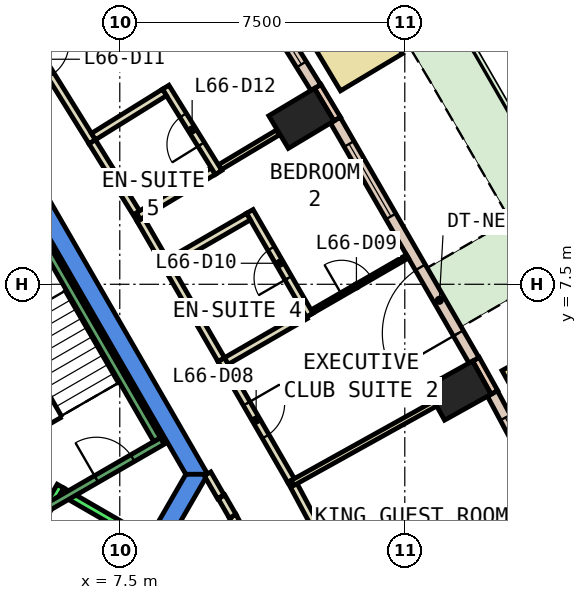
"""IFC4 building model, lengths in metres.
Left out: names, types, materials, properties, quantities, classifications, styles, units other than length and angle.
Written with IfcOpenShell. Run it as: python <this file> out.ifc"""

import sys

from ifc_helpers import new_model, si_unit, direction, frame, frame_2d, origin, origin_2d, place, context, subcontext, project, spatial, polyline, rectangle, outline, extrude, element, fill, save


model = new_model("IFC4")
c1 = context("Model", 3, precision=1e-05, world=origin(), true_north=direction((0.0, 1.0)))
c2 = subcontext(c1, "Body", "Model", "MODEL_VIEW")
j1 = project(units=[si_unit("LENGTHUNIT", "METRE"), si_unit("PLANEANGLEUNIT", "RADIAN")], contexts=[c1])
p1 = place(None, origin())
s1 = spatial("IfcSite", under=j1, at=p1, CompositionType="ELEMENT")
p2 = place(p1, origin())
s2 = spatial("IfcBuilding", under=s1, at=p2, CompositionType="ELEMENT")
p3 = place(p2, frame((0.0, 0.0, 286.4)))
s3 = spatial("IfcBuildingStorey", under=s2, at=p3, CompositionType="ELEMENT", Elevation=286.4)
for number, where, z_axis, x_axis in (
    (1, (16.415, 4.702, 0.0), (0.0, 0.0, 1.0), (-0.486, 0.874, 0.0)),
    (2, (12.279, 11.865, 0.0), (0.0, 0.0, 1.0), (-0.514, 0.858, 0.0)),
):
    element("IfcColumn", number, at=place(p3, frame(where, z_axis=z_axis, x_axis=x_axis)), inside=s3, PredefinedType="COLUMN", context=c2, shape_type="SweptSolid", body=[
        extrude(rectangle(XDim=1.0, YDim=1.4, at=origin_2d()), origin(), (0.0, 0.0, 1.0), 3.26),
    ])
p4 = place(p3, frame((0.0, 0.0, -0.6)))
e3 = element("IfcWall", 3, at=p4, inside=s3, PredefinedType="SHEAR", context=c2, shape_type="SweptSolid", body=[
    extrude(outline(polyline([(5.486, 9.998), (5.053, 9.748), (9.238, 2.5), (9.815, 2.5), (5.486, 9.998)])), origin(), (0.0, 0.0, 1.0), 3.86),
])
p5 = place(p3, frame((0.0, 0.0, -0.6)))
e4 = element("IfcWall", 4, at=p5, inside=s3, PredefinedType="SHEAR", context=c2, shape_type="SweptSolid", body=[
    extrude(outline(polyline([(4.907, -6.0), (9.815, 2.5), (9.238, 2.5), (4.619, -5.5), (4.907, -6.0)])), origin(), (0.0, 0.0, 1.0), 3.86),
])
p6 = place(p3, frame((17.358, 4.653, 0.0), z_axis=(0.0, 0.0, 1.0), x_axis=(-0.485850211157, 0.874042088414, 0.0)))
e5 = element("IfcWall", 5, at=p6, inside=s3, PredefinedType="STANDARD", context=c2, shape_type="SweptSolid", body=[
    extrude(rectangle(XDim=1.0, YDim=0.2, at=frame_2d((0.5, 0.0))), origin(), (0.0, 0.0, 1.0), 3.26),
])
p7 = place(p3, frame((13.222, 11.848, 0.0), z_axis=(0.0, 0.0, 1.0), x_axis=(-0.513777707721, 0.857923345672, 0.0)))
e6 = element("IfcWall", 6, at=p7, inside=s3, PredefinedType="STANDARD", context=c2, shape_type="SweptSolid", body=[
    extrude(rectangle(XDim=1.0, YDim=0.2, at=frame_2d((0.5, 0.0))), origin(), (0.0, 0.0, 1.0), 3.26),
])
p8 = place(p3, frame((20.739, -1.79, 0.0), z_axis=(0.0, 0.0, 1.0), x_axis=(-0.471789353675, 0.881711293882, 0.0)))
e7 = element("IfcWall", 7, at=p8, inside=s3, PredefinedType="STANDARD", context=c2, shape_type="SweptSolid", body=[
    extrude(rectangle(XDim=7.277, YDim=0.3, at=frame_2d((3.638, 0.0))), origin(), (0.0, 0.0, 1.0), 3.26),
])
p9 = place(p8, frame((0.719, 0.0, 0.9)))
e8 = element("IfcOpeningElement", 8, at=p9, cuts=e7, PredefinedType="OPENING", context=c2, shape_type="SweptSolid", body=[
    extrude(rectangle(XDim=2.2, YDim=2.0, at=frame_2d((1.1, 1.0))), frame((0.0, 0.16, 0.0), z_axis=(0.0, -1.0, 0.0), x_axis=(1.0, 0.0, 0.0)), (0.0, 0.0, 1.0), 0.32),
])
p10 = place(p8, frame((4.358, 0.0, 0.9)))
e9 = element("IfcOpeningElement", 9, at=p10, cuts=e7, PredefinedType="OPENING", context=c2, shape_type="SweptSolid", body=[
    extrude(rectangle(XDim=2.2, YDim=2.0, at=frame_2d((1.1, 1.0))), frame((0.0, 0.16, 0.0), z_axis=(0.0, -1.0, 0.0), x_axis=(1.0, 0.0, 0.0)), (0.0, 0.0, 1.0), 0.32),
])
p11 = place(p3, frame((16.821, 5.498, 0.0), z_axis=(0.0, 0.0, 1.0), x_axis=(-0.499945412946, 0.866056917341, 0.0)))
e10 = element("IfcWall", 10, at=p11, inside=s3, PredefinedType="STANDARD", context=c2, shape_type="SweptSolid", body=[
    extrude(rectangle(XDim=7.299, YDim=0.3, at=frame_2d((3.649, 0.0))), origin(), (0.0, 0.0, 1.0), 3.26),
])
p12 = place(p11, frame((0.825, 0.0, 0.0)))
e11 = element("IfcOpeningElement", 11, at=p12, cuts=e10, PredefinedType="OPENING", context=c2, shape_type="SweptSolid", body=[
    extrude(rectangle(XDim=2.0, YDim=2.4, at=frame_2d((1.0, 1.2))), frame((0.0, 0.16, 0.0), z_axis=(0.0, -1.0, 0.0), x_axis=(1.0, 0.0, 0.0)), (0.0, 0.0, 1.0), 0.32),
])
p13 = place(p11, frame((4.374, 0.0, 0.9)))
e12 = element("IfcOpeningElement", 12, at=p13, cuts=e10, PredefinedType="OPENING", context=c2, shape_type="SweptSolid", body=[
    extrude(rectangle(XDim=2.2, YDim=2.0, at=frame_2d((1.1, 1.0))), frame((0.0, 0.16, 0.0), z_axis=(0.0, -1.0, 0.0), x_axis=(1.0, 0.0, 0.0)), (0.0, 0.0, 1.0), 0.32),
])
p14 = place(p3, frame((12.659, 12.675, 0.0), z_axis=(0.0, 0.0, 1.0), x_axis=(-0.527762071678, 0.849392250788, 0.0)))
e13 = element("IfcWall", 13, at=p14, inside=s3, PredefinedType="STANDARD", context=c2, shape_type="SweptSolid", body=[
    extrude(rectangle(XDim=7.276, YDim=0.3, at=frame_2d((3.638, 0.0))), origin(), (0.0, 0.0, 1.0), 3.26),
])
p15 = place(p14, frame((0.719, 0.0, 0.9)))
e14 = element("IfcOpeningElement", 14, at=p15, cuts=e13, PredefinedType="OPENING", context=c2, shape_type="SweptSolid", body=[
    extrude(rectangle(XDim=2.2, YDim=2.0, at=frame_2d((1.1, 1.0))), frame((0.0, 0.16, 0.0), z_axis=(0.0, -1.0, 0.0), x_axis=(1.0, 0.0, 0.0)), (0.0, 0.0, 1.0), 0.32),
])
p16 = place(p14, frame((4.357, 0.0, 0.9)))
e15 = element("IfcOpeningElement", 15, at=p16, cuts=e13, PredefinedType="OPENING", context=c2, shape_type="SweptSolid", body=[
    extrude(rectangle(XDim=2.2, YDim=2.0, at=frame_2d((1.1, 1.0))), frame((0.0, 0.16, 0.0), z_axis=(0.0, -1.0, 0.0), x_axis=(1.0, 0.0, 0.0)), (0.0, 0.0, 1.0), 0.32),
])
p17 = place(p3, frame((20.642, 1.634, 0.0), z_axis=(0.0, 0.0, 1.0), x_axis=(-0.485696527213, 0.874127498397, 0.0)))
e16 = element("IfcWall", 16, at=p17, inside=s3, PredefinedType="STANDARD", context=c2, shape_type="SweptSolid", body=[
    extrude(rectangle(XDim=4.641, YDim=1.9, at=frame_2d((2.321, 0.0))), origin(), (0.0, 0.0, 1.0), 0.8),
])
p18 = place(p3, frame((14.123, 13.079, 0.0), z_axis=(0.0, 0.0, 1.0), x_axis=(-0.514333285091, 0.857590386984, 0.0)))
e17 = element("IfcWall", 17, at=p18, inside=s3, PredefinedType="STANDARD", context=c2, shape_type="SweptSolid", body=[
    extrude(rectangle(XDim=4.641, YDim=1.9, at=frame_2d((2.32, 0.0))), origin(), (0.0, 0.0, 1.0), 0.8),
])
p19 = place(p3, frame((13.89, -4.994, 0.0), z_axis=(0.0, 0.0, 1.0), x_axis=(-0.471713767504, 0.881751734644, 0.0)))
e18 = element("IfcWall", 18, at=p19, inside=s3, PredefinedType="PARTITIONING", context=c2, shape_type="SweptSolid", body=[
    extrude(rectangle(XDim=7.248, YDim=0.2, at=frame_2d((3.624, 0.0))), origin(), (0.0, 0.0, 1.0), 3.26),
])
p20 = place(p19, frame((2.724, 0.0, 0.0)))
e19 = element("IfcOpeningElement", 19, at=p20, cuts=e18, PredefinedType="OPENING", context=c2, shape_type="SweptSolid", body=[
    extrude(rectangle(XDim=1.8, YDim=2.1, at=frame_2d((0.9, 1.05))), frame((0.0, 0.11, 0.0), z_axis=(0.0, -1.0, 0.0), x_axis=(1.0, 0.0, 0.0)), (0.0, 0.0, 1.0), 0.22),
])
p21 = place(p3, frame((10.471, 1.397, 0.0), z_axis=(0.0, 0.0, 1.0), x_axis=(-0.500069990121, 0.865984991198, 0.0)))
e20 = element("IfcWall", 20, at=p21, inside=s3, PredefinedType="PARTITIONING", context=c2, shape_type="SweptSolid", body=[
    extrude(rectangle(XDim=0.588, YDim=0.2, at=frame_2d((0.294, 0.0))), origin(), (0.0, 0.0, 1.0), 3.26),
])
p22 = place(p3, frame((10.157, 1.912, 0.0), z_axis=(0.0, 0.0, 1.0), x_axis=(-0.500482383858, 0.865746720148, 0.0)))
e21 = element("IfcWall", 21, at=p22, inside=s3, PredefinedType="PARTITIONING", context=c2, shape_type="SweptSolid", body=[
    extrude(rectangle(XDim=0.695, YDim=0.2, at=frame_2d((0.348, 0.0))), origin(), (0.0, 0.0, 1.0), 3.26),
])
p23 = place(p3, frame((12.009, 2.338, 0.0), z_axis=(0.0, 0.0, 1.0), x_axis=(0.471771260231, -0.88172097515, 0.0)))
e22 = element("IfcWall", 22, at=p23, inside=s3, PredefinedType="PARTITIONING", context=c2, shape_type="SweptSolid", body=[
    extrude(rectangle(XDim=5.193, YDim=0.2, at=frame_2d((2.597, 0.0))), origin(), (0.0, 0.0, 1.0), 3.26),
])
p24 = place(p23, frame((2.146, 0.0, 0.0)))
e23 = element("IfcOpeningElement", 23, at=p24, cuts=e22, PredefinedType="OPENING", context=c2, shape_type="SweptSolid", body=[
    extrude(rectangle(XDim=1.0, YDim=2.1, at=frame_2d((0.5, 1.05))), frame((0.0, 0.11, 0.0), z_axis=(0.0, -1.0, 0.0), x_axis=(1.0, 0.0, 0.0)), (0.0, 0.0, 1.0), 0.22),
])
p25 = place(p3, frame((10.17, 5.519, 0.0), z_axis=(0.0, 0.0, 1.0), x_axis=(0.499990860175, -0.866030680601, 0.0)))
e24 = element("IfcWall", 24, at=p25, inside=s3, PredefinedType="PARTITIONING", context=c2, shape_type="SweptSolid", body=[
    extrude(rectangle(XDim=3.674, YDim=0.2, at=frame_2d((1.837, 0.0))), origin(), (0.0, 0.0, 1.0), 3.26),
])
p26 = place(p25, frame((1.337, 0.0, 0.0)))
e25 = element("IfcOpeningElement", 25, at=p26, cuts=e24, PredefinedType="OPENING", context=c2, shape_type="SweptSolid", body=[
    extrude(rectangle(XDim=1.0, YDim=2.1, at=frame_2d((0.5, 1.05))), frame((0.0, 0.11, 0.0), z_axis=(0.0, -1.0, 0.0), x_axis=(1.0, 0.0, 0.0)), (0.0, 0.0, 1.0), 0.22),
])
p27 = place(p3, frame((8.039, 9.209, 0.0), z_axis=(0.0, 0.0, 1.0), x_axis=(0.500219543227, -0.865898613334, 0.0)))
e26 = element("IfcWall", 26, at=p27, inside=s3, PredefinedType="PARTITIONING", context=c2, shape_type="SweptSolid", body=[
    extrude(rectangle(XDim=1.261, YDim=0.2, at=frame_2d((0.631, 0.0))), origin(), (0.0, 0.0, 1.0), 3.26),
])
p28 = place(p3, frame((8.67, 8.117, 0.0), z_axis=(0.0, 0.0, 1.0), x_axis=(0.50002537861, -0.866010750942, 0.0)))
e27 = element("IfcWall", 27, at=p28, inside=s3, PredefinedType="PARTITIONING", context=c2, shape_type="SweptSolid", body=[
    extrude(rectangle(XDim=3.0, YDim=0.2, at=frame_2d((1.5, 0.0))), origin(), (0.0, 0.0, 1.0), 3.26),
])
p29 = place(p3, frame((4.022, 15.68, 0.0), z_axis=(0.0, 0.0, 1.0), x_axis=(0.527737948498, -0.849407239029, 0.0)))
e28 = element("IfcWall", 28, at=p29, inside=s3, PredefinedType="PARTITIONING", context=c2, shape_type="SweptSolid", body=[
    extrude(rectangle(XDim=5.217, YDim=0.2, at=frame_2d((2.608, 0.0))), origin(), (0.0, 0.0, 1.0), 3.26),
])
p30 = place(p29, frame((2.159, 0.0, 0.0)))
e29 = element("IfcOpeningElement", 29, at=p30, cuts=e28, PredefinedType="OPENING", context=c2, shape_type="SweptSolid", body=[
    extrude(rectangle(XDim=1.0, YDim=2.1, at=frame_2d((0.5, 1.05))), frame((0.0, 0.11, 0.0), z_axis=(0.0, -1.0, 0.0), x_axis=(1.0, 0.0, 0.0)), (0.0, 0.0, 1.0), 0.22),
])
p31 = place(p3, frame((6.775, 11.249, 0.0), z_axis=(0.0, 0.0, 1.0), x_axis=(0.527803270752, -0.849366650736, 0.0)))
e30 = element("IfcWall", 30, at=p31, inside=s3, PredefinedType="PARTITIONING", context=c2, shape_type="SweptSolid", body=[
    extrude(rectangle(XDim=2.401, YDim=0.2, at=frame_2d((1.2, 0.0))), origin(), (0.0, 0.0, 1.0), 3.26),
])
p32 = place(p3, frame((12.045, 2.272, 0.0), z_axis=(0.0, 0.0, 1.0), x_axis=(0.873982340973, 0.485957680943, 0.0)))
e31 = element("IfcWall", 31, at=p32, inside=s3, PredefinedType="PARTITIONING", context=c2, shape_type="SweptSolid", body=[
    extrude(rectangle(XDim=4.28, YDim=0.15, at=frame_2d((2.14, 0.0))), origin(), (0.0, 0.0, 1.0), 3.26),
])
p33 = place(p3, frame((12.385, 6.682, 0.0), z_axis=(0.0, 0.0, 1.0), x_axis=(0.865970446821, 0.500095176175, 0.0)))
e32 = element("IfcWall", 32, at=p33, inside=s3, PredefinedType="PARTITIONING", context=c2, shape_type="SweptSolid", body=[
    extrude(rectangle(XDim=3.1, YDim=0.1, at=frame_2d((1.55, 0.0))), origin(), (0.0, 0.0, 1.0), 3.26),
])
p34 = place(p33, frame((1.1, 0.0, 0.0)))
e33 = element("IfcOpeningElement", 33, at=p34, cuts=e32, PredefinedType="OPENING", context=c2, shape_type="SweptSolid", body=[
    extrude(rectangle(XDim=0.9, YDim=2.1, at=frame_2d((0.45, 1.05))), frame((0.0, 0.06, 0.0), z_axis=(0.0, -1.0, 0.0), x_axis=(1.0, 0.0, 0.0)), (0.0, 0.0, 1.0), 0.12),
])
p35 = place(p3, frame((10.306, 5.482, 0.0), z_axis=(0.0, 0.0, 1.0), x_axis=(0.866100915363, 0.499869187296, 0.0)))
e34 = element("IfcWall", 34, at=p35, inside=s3, PredefinedType="PARTITIONING", context=c2, shape_type="SweptSolid", body=[
    extrude(rectangle(XDim=2.401, YDim=0.2, at=frame_2d((1.2, 0.0))), origin(), (0.0, 0.0, 1.0), 3.26),
])
p36 = place(p3, frame((12.496, 6.689, 0.0), z_axis=(0.0, 0.0, 1.0), x_axis=(-0.500039995618, 0.866002311072, 0.0)))
e35 = element("IfcWall", 35, at=p36, inside=s3, PredefinedType="PARTITIONING", context=c2, shape_type="SweptSolid", body=[
    extrude(rectangle(XDim=3.15, YDim=0.2, at=frame_2d((1.575, 0.0))), origin(), (0.0, 0.0, 1.0), 3.26),
])
p37 = place(p36, frame((1.125, 0.0, 0.0)))
e36 = element("IfcOpeningElement", 36, at=p37, cuts=e35, PredefinedType="OPENING", context=c2, shape_type="SweptSolid", body=[
    extrude(rectangle(XDim=0.9, YDim=2.1, at=frame_2d((0.45, 1.05))), frame((0.0, 0.11, 0.0), z_axis=(0.0, -1.0, 0.0), x_axis=(1.0, 0.0, 0.0)), (0.0, 0.0, 1.0), 0.22),
])
p38 = place(p3, frame((10.885, 9.28, 0.0), z_axis=(0.0, 0.0, 1.0), x_axis=(-0.866022959057, -0.500004234368, 0.0)))
e37 = element("IfcWall", 37, at=p38, inside=s3, PredefinedType="PARTITIONING", context=c2, shape_type="SweptSolid", body=[
    extrude(rectangle(XDim=2.5, YDim=0.2, at=frame_2d((1.25, 0.0))), origin(), (0.0, 0.0, 1.0), 3.26),
])
p39 = place(p3, frame((10.133, 10.58, 0.0), z_axis=(0.0, 0.0, 1.0), x_axis=(0.857903919212, 0.513810145287, 0.0)))
e38 = element("IfcWall", 38, at=p39, inside=s3, PredefinedType="PARTITIONING", context=c2, shape_type="SweptSolid", body=[
    extrude(rectangle(XDim=1.781, YDim=0.15, at=frame_2d((0.891, 0.0))), origin(), (0.0, 0.0, 1.0), 3.26),
])
p40 = place(p3, frame((7.989, 9.295, 0.0), z_axis=(0.0, 0.0, 1.0), x_axis=(0.857801856135, 0.513980520654, 0.0)))
e39 = element("IfcWall", 39, at=p40, inside=s3, PredefinedType="PARTITIONING", context=c2, shape_type="SweptSolid", body=[
    extrude(rectangle(XDim=2.3, YDim=0.2, at=frame_2d((1.15, 0.0))), origin(), (0.0, 0.0, 1.0), 3.26),
])
p41 = place(p3, frame((10.1, 10.443, 0.0), z_axis=(0.0, 0.0, 1.0), x_axis=(-0.527510239672, 0.849548672555, 0.0)))
e40 = element("IfcWall", 40, at=p41, inside=s3, PredefinedType="PARTITIONING", context=c2, shape_type="SweptSolid", body=[
    extrude(rectangle(XDim=2.639, YDim=0.2, at=frame_2d((1.319, 0.0))), origin(), (0.0, 0.0, 1.0), 3.26),
])
p42 = place(p41, frame((0.869, 0.0, 0.0)))
e41 = element("IfcOpeningElement", 41, at=p42, cuts=e40, PredefinedType="OPENING", context=c2, shape_type="SweptSolid", body=[
    extrude(rectangle(XDim=0.9, YDim=2.1, at=frame_2d((0.45, 1.05))), frame((0.0, 0.11, 0.0), z_axis=(0.0, -1.0, 0.0), x_axis=(1.0, 0.0, 0.0)), (0.0, 0.0, 1.0), 0.22),
])
p43 = place(p3, frame((8.676, 12.548, 0.0), z_axis=(0.0, 0.0, 1.0), x_axis=(-0.849286670427, -0.527931957202, 0.0)))
e42 = element("IfcWall", 42, at=p43, inside=s3, PredefinedType="PARTITIONING", context=c2, shape_type="SweptSolid", body=[
    extrude(rectangle(XDim=2.199, YDim=0.2, at=frame_2d((1.1, 0.0))), origin(), (0.0, 0.0, 1.0), 3.26),
])
p44 = place(p3, frame((3.24, -2.488, 0.0), z_axis=(0.0, 0.0, 1.0), x_axis=(0.500034260056, 0.866005622828, 0.0)))
e43 = element("IfcWall", 43, at=p44, inside=s3, PredefinedType="STANDARD", context=c2, shape_type="SweptSolid", body=[
    extrude(rectangle(XDim=5.399, YDim=0.2, at=frame_2d((2.7, 0.0))), origin(), (0.0, 0.0, 1.0), 3.26),
])
p45 = place(p44, frame((3.225, 0.0, 0.0)))
e44 = element("IfcOpeningElement", 44, at=p45, cuts=e43, PredefinedType="OPENING", context=c2, shape_type="SweptSolid", body=[
    extrude(rectangle(XDim=1.1, YDim=2.1, at=frame_2d((0.55, 1.05))), frame((0.0, 0.11, 0.0), z_axis=(0.0, -1.0, 0.0), x_axis=(1.0, 0.0, 0.0)), (0.0, 0.0, 1.0), 0.22),
])
p46 = place(p44, frame((1.225, 0.0, 0.0)))
e45 = element("IfcOpeningElement", 45, at=p46, cuts=e43, PredefinedType="OPENING", context=c2, shape_type="SweptSolid", body=[
    extrude(rectangle(XDim=1.1, YDim=2.1, at=frame_2d((0.55, 1.05))), frame((0.0, 0.11, 0.0), z_axis=(0.0, -1.0, 0.0), x_axis=(1.0, 0.0, 0.0)), (0.0, 0.0, 1.0), 0.22),
])
p47 = place(p3, frame((5.977, 2.052, 0.0), z_axis=(0.0, 0.0, 1.0), x_axis=(0.865973769406, -0.500089422704, 0.0)))
e46 = element("IfcWall", 46, at=p47, inside=s3, PredefinedType="STANDARD", context=c2, shape_type="SweptSolid", body=[
    extrude(rectangle(XDim=2.399, YDim=0.2, at=frame_2d((1.2, 0.0))), origin(), (0.0, 0.0, 1.0), 3.26),
])
p48 = place(p3, frame((4.806, 1.176, 0.0), z_axis=(0.0, 0.0, 1.0), x_axis=(0.866059941101, 0.499940174841, 0.0)))
e47 = element("IfcWall", 47, at=p48, inside=s3, PredefinedType="STANDARD", context=c2, shape_type="SweptSolid", body=[
    extrude(rectangle(XDim=4.4, YDim=0.2, at=frame_2d((2.2, 0.0))), origin(), (0.0, 0.0, 1.0), 3.26),
])
p49 = place(p48, frame((2.4, 0.0, 0.0)))
e48 = element("IfcOpeningElement", 48, at=p49, cuts=e47, PredefinedType="OPENING", context=c2, shape_type="SweptSolid", body=[
    extrude(rectangle(XDim=1.1, YDim=2.2, at=frame_2d((0.55, 1.1))), frame((0.0, 0.11, 0.0), z_axis=(0.0, -1.0, 0.0), x_axis=(1.0, 0.0, 0.0)), (0.0, 0.0, 1.0), 0.22),
])
p50 = place(p3, frame((8.48, 3.412, 0.0), z_axis=(0.0, 0.0, 1.0), x_axis=(-0.499978703459, 0.866037698999, 0.0)))
e49 = element("IfcWall", 49, at=p50, inside=s3, PredefinedType="STANDARD", context=c2, shape_type="SweptSolid", body=[
    extrude(rectangle(XDim=6.9, YDim=0.2, at=frame_2d((3.45, 0.0))), origin(), (0.0, 0.0, 1.0), 3.26),
])
p51 = place(p10, origin())
e50 = element("IfcWindow", 50, at=p51, inside=s3, PartitioningType="SINGLE_PANEL", PredefinedType="WINDOW", context=c2, shape_type="SweptSolid", body=[
    extrude(rectangle(XDim=2.2, YDim=2.0, at=frame_2d((1.1, 1.0))), frame((0.0, 0.03, 0.0), z_axis=(0.0, -1.0, 0.0), x_axis=(1.0, 0.0, 0.0)), (0.0, 0.0, 1.0), 0.06),
])
fill(e9, e50)
p52 = place(p12, origin())
e51 = element("IfcDoor", 51, at=p52, inside=s3, OperationType="SLIDING_TO_LEFT", PredefinedType="DOOR", context=c2, shape_type="SweptSolid", body=[
    extrude(rectangle(XDim=2.0, YDim=2.4, at=frame_2d((1.0, 1.2))), frame((0.0, 0.025, 0.0), z_axis=(0.0, -1.0, 0.0), x_axis=(1.0, 0.0, 0.0)), (0.0, 0.0, 1.0), 0.05),
])
fill(e11, e51)
p53 = place(p13, origin())
e52 = element("IfcWindow", 52, at=p53, inside=s3, PartitioningType="SINGLE_PANEL", PredefinedType="WINDOW", context=c2, shape_type="SweptSolid", body=[
    extrude(rectangle(XDim=2.2, YDim=2.0, at=frame_2d((1.1, 1.0))), frame((0.0, 0.03, 0.0), z_axis=(0.0, -1.0, 0.0), x_axis=(1.0, 0.0, 0.0)), (0.0, 0.0, 1.0), 0.06),
])
fill(e12, e52)
p54 = place(p15, origin())
e53 = element("IfcWindow", 53, at=p54, inside=s3, PartitioningType="SINGLE_PANEL", PredefinedType="WINDOW", context=c2, shape_type="SweptSolid", body=[
    extrude(rectangle(XDim=2.2, YDim=2.0, at=frame_2d((1.1, 1.0))), frame((0.0, 0.03, 0.0), z_axis=(0.0, -1.0, 0.0), x_axis=(1.0, 0.0, 0.0)), (0.0, 0.0, 1.0), 0.06),
])
fill(e14, e53)
p55 = place(p26, origin())
e54 = element("IfcDoor", 54, at=p55, inside=s3, OperationType="SINGLE_SWING_LEFT", PredefinedType="DOOR", context=c2, shape_type="SweptSolid", body=[
    extrude(rectangle(XDim=1.0, YDim=2.1, at=frame_2d((0.5, 1.05))), frame((0.0, 0.025, 0.0), z_axis=(0.0, -1.0, 0.0), x_axis=(1.0, 0.0, 0.0)), (0.0, 0.0, 1.0), 0.05),
])
fill(e25, e54)
p56 = place(p34, origin())
e55 = element("IfcDoor", 55, at=p56, inside=s3, OperationType="SINGLE_SWING_RIGHT", PredefinedType="DOOR", context=c2, shape_type="SweptSolid", body=[
    extrude(rectangle(XDim=0.9, YDim=2.1, at=frame_2d((0.45, 1.05))), frame((0.0, 0.025, 0.0), z_axis=(0.0, -1.0, 0.0), x_axis=(1.0, 0.0, 0.0)), (0.0, 0.0, 1.0), 0.05),
])
fill(e33, e55)
p57 = place(p37, origin())
e56 = element("IfcDoor", 56, at=p57, inside=s3, OperationType="SINGLE_SWING_RIGHT", PredefinedType="DOOR", context=c2, shape_type="SweptSolid", body=[
    extrude(rectangle(XDim=0.9, YDim=2.1, at=frame_2d((0.45, 1.05))), frame((0.0, 0.025, 0.0), z_axis=(0.0, -1.0, 0.0), x_axis=(1.0, 0.0, 0.0)), (0.0, 0.0, 1.0), 0.05),
])
fill(e36, e56)
p58 = place(p42, origin())
e57 = element("IfcDoor", 57, at=p58, inside=s3, OperationType="SINGLE_SWING_LEFT", PredefinedType="DOOR", context=c2, shape_type="SweptSolid", body=[
    extrude(rectangle(XDim=0.9, YDim=2.1, at=frame_2d((0.45, 1.05))), frame((0.0, 0.025, 0.0), z_axis=(0.0, -1.0, 0.0), x_axis=(1.0, 0.0, 0.0)), (0.0, 0.0, 1.0), 0.05),
])
fill(e41, e57)
p59 = place(p49, origin())
e58 = element("IfcDoor", 58, at=p59, inside=s3, OperationType="SINGLE_SWING_LEFT", PredefinedType="DOOR", context=c2, shape_type="SweptSolid", body=[
    extrude(rectangle(XDim=1.1, YDim=2.2, at=frame_2d((0.55, 1.1))), frame((0.0, 0.025, 0.0), z_axis=(0.0, -1.0, 0.0), x_axis=(1.0, 0.0, 0.0)), (0.0, 0.0, 1.0), 0.05),
])
fill(e48, e58)
save(model, sys.argv[1])
